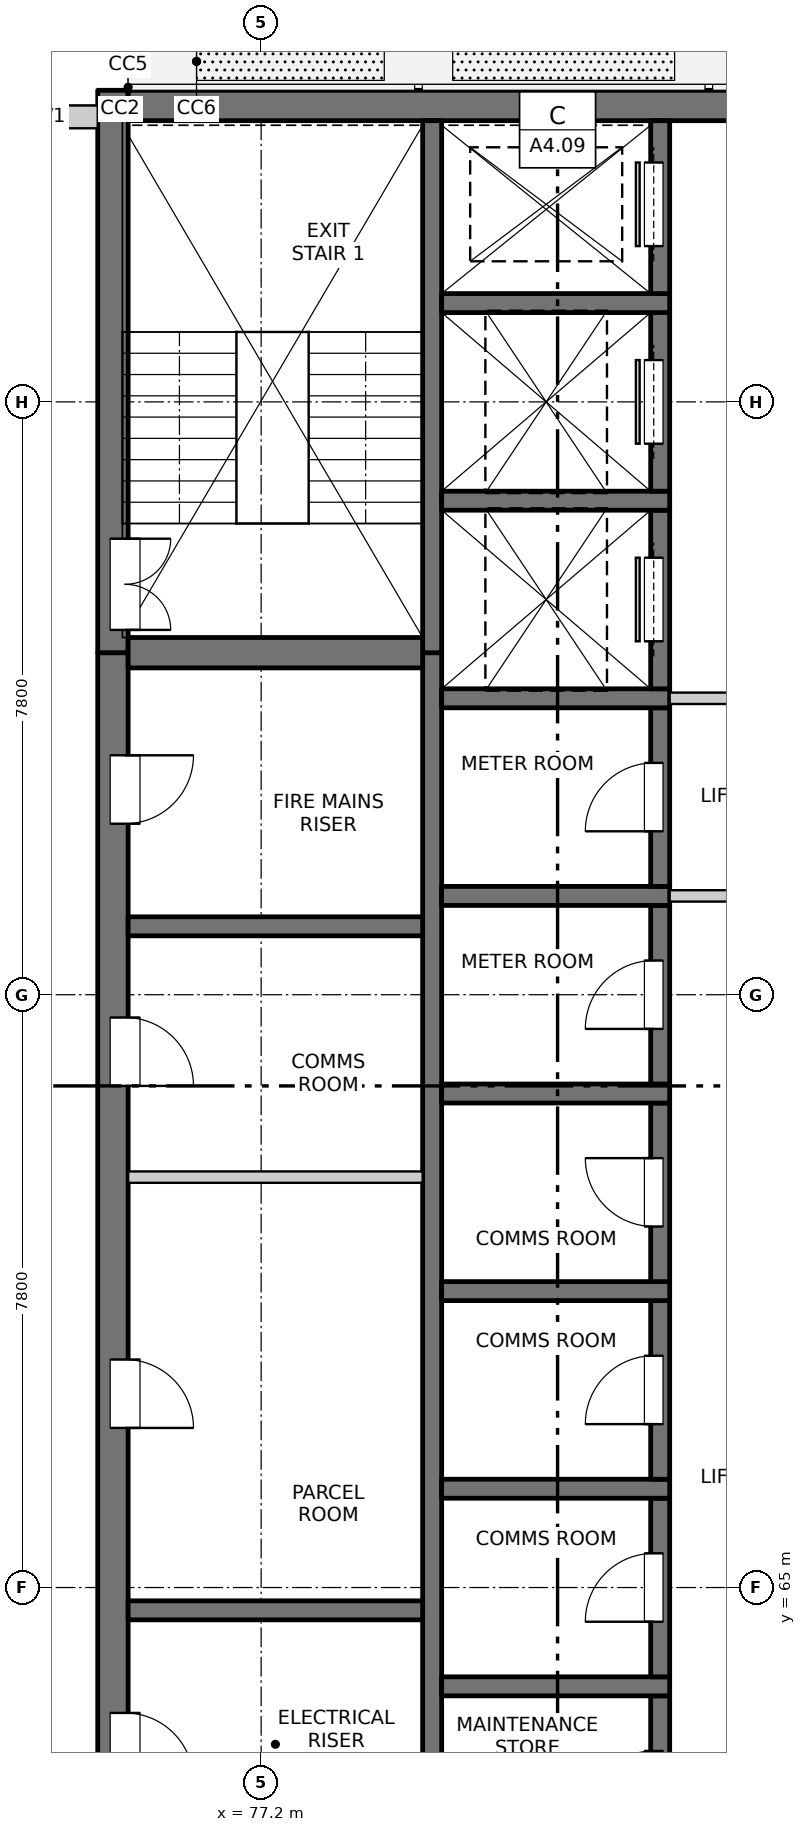
"""IFC4 building model, lengths in metres.
Left out: names, types, materials, properties, quantities, classifications, styles, units other than length and angle.
Written with IfcOpenShell. Run it as: python <this file> out.ifc"""

import sys

from ifc_helpers import new_model, si_unit, direction, frame, frame_2d, origin, place, context, subcontext, project, spatial, rectangle, extrude, element, fill, save


model = new_model("IFC4")
c1 = context("Model", 3, precision=1e-05, world=origin(), true_north=direction((0.0, 1.0)))
c2 = subcontext(c1, "Body", "Model", "MODEL_VIEW")
j1 = project(units=[si_unit("LENGTHUNIT", "METRE"), si_unit("PLANEANGLEUNIT", "RADIAN")], contexts=[c1])
p1 = place(None, origin())
s1 = spatial("IfcSite", under=j1, at=p1, CompositionType="ELEMENT")
p2 = place(p1, origin())
s2 = spatial("IfcBuilding", under=s1, at=p2, CompositionType="ELEMENT")
p3 = place(p2, frame((0.0, 0.0, 246.0)))
s3 = spatial("IfcBuildingStorey", under=s2, at=p3, CompositionType="ELEMENT", Elevation=246.0)
p4 = place(p3, frame((75.25, 55.05, -0.3), z_axis=(0.0, 0.0, 1.0), x_axis=(0.0, 1.0, 0.0)))
e1 = element("IfcWall", 1, at=p4, inside=s3, PredefinedType="SOLIDWALL", context=c2, shape_type="SweptSolid", body=[
    extrude(rectangle(XDim=22.25, YDim=0.4, at=frame_2d((11.125, 0.0))), origin(), (0.0, 0.0, 1.0), 3.45),
])
p5 = place(p4, frame((7.4, 0.0, 0.3)))
e2 = element("IfcOpeningElement", 2, at=p5, cuts=e1, PredefinedType="OPENING", context=c2, shape_type="SweptSolid", body=[
    extrude(rectangle(XDim=0.9, YDim=2.1, at=frame_2d((0.45, 1.05))), frame((0.0, 0.21, 0.0), z_axis=(0.0, -1.0, 0.0), x_axis=(1.0, 0.0, 0.0)), (0.0, 0.0, 1.0), 0.42),
])
p6 = place(p4, frame((12.05, 0.0, 0.3)))
e3 = element("IfcOpeningElement", 3, at=p6, cuts=e1, PredefinedType="OPENING", context=c2, shape_type="SweptSolid", body=[
    extrude(rectangle(XDim=0.9, YDim=2.1, at=frame_2d((0.45, 1.05))), frame((0.0, 0.21, 0.0), z_axis=(0.0, -1.0, 0.0), x_axis=(1.0, 0.0, 0.0)), (0.0, 0.0, 1.0), 0.42),
])
p7 = place(p4, frame((16.55, 0.0, 0.3)))
e4 = element("IfcOpeningElement", 4, at=p7, cuts=e1, PredefinedType="OPENING", context=c2, shape_type="SweptSolid", body=[
    extrude(rectangle(XDim=0.9, YDim=2.1, at=frame_2d((0.45, 1.05))), frame((0.0, 0.21, 0.0), z_axis=(0.0, -1.0, 0.0), x_axis=(1.0, 0.0, 0.0)), (0.0, 0.0, 1.0), 0.42),
])
p8 = place(p4, frame((20.0, 0.0, 0.3)))
e5 = element("IfcOpeningElement", 5, at=p8, cuts=e1, PredefinedType="OPENING", context=c2, shape_type="SweptSolid", body=[
    extrude(rectangle(XDim=0.9, YDim=2.1, at=frame_2d((0.45, 1.05))), frame((0.0, 0.21, 0.0), z_axis=(0.0, -1.0, 0.0), x_axis=(1.0, 0.0, 0.0)), (0.0, 0.0, 1.0), 0.42),
])
p9 = place(p3, frame((75.25, 77.3, -0.3), z_axis=(0.0, 0.0, 1.0), x_axis=(0.0, 1.0, 0.0)))
e6 = element("IfcWall", 6, at=p9, inside=s3, PredefinedType="SOLIDWALL", context=c2, shape_type="SweptSolid", body=[
    extrude(rectangle(XDim=7.4, YDim=0.4, at=frame_2d((3.7, 0.0))), origin(), (0.0, 0.0, 1.0), 3.45),
])
p10 = place(p9, frame((0.3, 0.0, 0.3)))
e7 = element("IfcOpeningElement", 7, at=p10, cuts=e6, PredefinedType="OPENING", context=c2, shape_type="SweptSolid", body=[
    extrude(rectangle(XDim=1.2, YDim=2.1, at=frame_2d((0.6, 1.05))), frame((0.0, 0.21, 0.0), z_axis=(0.0, -1.0, 0.0), x_axis=(1.0, 0.0, 0.0)), (0.0, 0.0, 1.0), 0.42),
])
p11 = place(p3, frame((75.45, 84.5, -0.3), z_axis=(0.0, 0.0, 1.0), x_axis=(1.0, 0.0, 0.0)))
e8 = element("IfcWall", 8, at=p11, inside=s3, PredefinedType="SOLIDWALL", context=c2, shape_type="SweptSolid", body=[
    extrude(rectangle(XDim=19.1, YDim=0.4, at=frame_2d((9.55, 0.0))), origin(), (0.0, 0.0, 1.0), 3.45),
])
p12 = place(p3, frame((79.45, 60.975, -0.3), z_axis=(0.0, 0.0, 1.0), x_axis=(0.0, 1.0, 0.0)))
e9 = element("IfcWall", 9, at=p12, inside=s3, PredefinedType="SOLIDWALL", context=c2, shape_type="SweptSolid", body=[
    extrude(rectangle(XDim=16.325, YDim=0.25, at=frame_2d((8.163, 0.0))), origin(), (0.0, 0.0, 1.0), 3.45),
])
p13 = place(p3, frame((79.45, 77.3, -0.3), z_axis=(0.0, 0.0, 1.0), x_axis=(0.0, 1.0, 0.0)))
e10 = element("IfcWall", 10, at=p13, inside=s3, PredefinedType="SOLIDWALL", context=c2, shape_type="SweptSolid", body=[
    extrude(rectangle(XDim=7.0, YDim=0.25, at=frame_2d((3.5, 0.0))), origin(), (0.0, 0.0, 1.0), 3.45),
])
p14 = place(p3, frame((82.45, 61.225, -0.3), z_axis=(0.0, 0.0, 1.0), x_axis=(0.0, 1.0, 0.0)))
e11 = element("IfcWall", 11, at=p14, inside=s3, PredefinedType="SOLIDWALL", context=c2, shape_type="SweptSolid", body=[
    extrude(rectangle(XDim=2.35, YDim=0.25, at=frame_2d((1.175, 0.0))), origin(), (0.0, 0.0, 1.0), 3.45),
])
p15 = place(p14, frame((0.725, 0.0, 0.3)))
e12 = element("IfcOpeningElement", 12, at=p15, cuts=e11, PredefinedType="OPENING", context=c2, shape_type="SweptSolid", body=[
    extrude(rectangle(XDim=0.9, YDim=2.1, at=frame_2d((0.45, 1.05))), frame((0.0, 0.135, 0.0), z_axis=(0.0, -1.0, 0.0), x_axis=(1.0, 0.0, 0.0)), (0.0, 0.0, 1.0), 0.27),
])
p16 = place(p3, frame((79.575, 63.7, -0.3), z_axis=(0.0, 0.0, 1.0), x_axis=(1.0, 0.0, 0.0)))
e13 = element("IfcWall", 13, at=p16, inside=s3, PredefinedType="SOLIDWALL", context=c2, shape_type="SweptSolid", body=[
    extrude(rectangle(XDim=3.0, YDim=0.25, at=frame_2d((1.5, 0.0))), origin(), (0.0, 0.0, 1.0), 3.45),
])
p17 = place(p3, frame((82.45, 63.825, -0.3), z_axis=(0.0, 0.0, 1.0), x_axis=(0.0, 1.0, 0.0)))
e14 = element("IfcWall", 14, at=p17, inside=s3, PredefinedType="SOLIDWALL", context=c2, shape_type="SweptSolid", body=[
    extrude(rectangle(XDim=2.35, YDim=0.25, at=frame_2d((1.175, 0.0))), origin(), (0.0, 0.0, 1.0), 3.45),
])
p18 = place(p17, frame((0.725, 0.0, 0.3)))
e15 = element("IfcOpeningElement", 15, at=p18, cuts=e14, PredefinedType="OPENING", context=c2, shape_type="SweptSolid", body=[
    extrude(rectangle(XDim=0.9, YDim=2.1, at=frame_2d((0.45, 1.05))), frame((0.0, 0.135, 0.0), z_axis=(0.0, -1.0, 0.0), x_axis=(1.0, 0.0, 0.0)), (0.0, 0.0, 1.0), 0.27),
])
p19 = place(p3, frame((79.575, 66.3, -0.3), z_axis=(0.0, 0.0, 1.0), x_axis=(1.0, 0.0, 0.0)))
e16 = element("IfcWall", 16, at=p19, inside=s3, PredefinedType="SOLIDWALL", context=c2, shape_type="SweptSolid", body=[
    extrude(rectangle(XDim=3.0, YDim=0.25, at=frame_2d((1.5, 0.0))), origin(), (0.0, 0.0, 1.0), 3.45),
])
p20 = place(p3, frame((82.45, 66.425, -0.3), z_axis=(0.0, 0.0, 1.0), x_axis=(0.0, 1.0, 0.0)))
e17 = element("IfcWall", 17, at=p20, inside=s3, PredefinedType="SOLIDWALL", context=c2, shape_type="SweptSolid", body=[
    extrude(rectangle(XDim=2.35, YDim=0.25, at=frame_2d((1.175, 0.0))), origin(), (0.0, 0.0, 1.0), 3.45),
])
p21 = place(p20, frame((0.725, 0.0, 0.3)))
e18 = element("IfcOpeningElement", 18, at=p21, cuts=e17, PredefinedType="OPENING", context=c2, shape_type="SweptSolid", body=[
    extrude(rectangle(XDim=0.9, YDim=2.1, at=frame_2d((0.45, 1.05))), frame((0.0, 0.135, 0.0), z_axis=(0.0, -1.0, 0.0), x_axis=(1.0, 0.0, 0.0)), (0.0, 0.0, 1.0), 0.27),
])
p22 = place(p3, frame((79.575, 68.9, -0.3), z_axis=(0.0, 0.0, 1.0), x_axis=(1.0, 0.0, 0.0)))
e19 = element("IfcWall", 19, at=p22, inside=s3, PredefinedType="SOLIDWALL", context=c2, shape_type="SweptSolid", body=[
    extrude(rectangle(XDim=3.0, YDim=0.25, at=frame_2d((1.5, 0.0))), origin(), (0.0, 0.0, 1.0), 3.45),
])
p23 = place(p3, frame((82.45, 69.025, -0.3), z_axis=(0.0, 0.0, 1.0), x_axis=(0.0, 1.0, 0.0)))
e20 = element("IfcWall", 20, at=p23, inside=s3, PredefinedType="SOLIDWALL", context=c2, shape_type="SweptSolid", body=[
    extrude(rectangle(XDim=2.35, YDim=0.25, at=frame_2d((1.175, 0.0))), origin(), (0.0, 0.0, 1.0), 3.45),
])
p24 = place(p23, frame((0.725, 0.0, 0.3)))
e21 = element("IfcOpeningElement", 21, at=p24, cuts=e20, PredefinedType="OPENING", context=c2, shape_type="SweptSolid", body=[
    extrude(rectangle(XDim=0.9, YDim=2.1, at=frame_2d((0.45, 1.05))), frame((0.0, 0.135, 0.0), z_axis=(0.0, -1.0, 0.0), x_axis=(1.0, 0.0, 0.0)), (0.0, 0.0, 1.0), 0.27),
])
p25 = place(p3, frame((79.575, 71.5, -0.3), z_axis=(0.0, 0.0, 1.0), x_axis=(1.0, 0.0, 0.0)))
e22 = element("IfcWall", 22, at=p25, inside=s3, PredefinedType="SOLIDWALL", context=c2, shape_type="SweptSolid", body=[
    extrude(rectangle(XDim=3.0, YDim=0.25, at=frame_2d((1.5, 0.0))), origin(), (0.0, 0.0, 1.0), 3.45),
])
p26 = place(p3, frame((82.45, 71.625, -0.3), z_axis=(0.0, 0.0, 1.0), x_axis=(0.0, 1.0, 0.0)))
e23 = element("IfcWall", 23, at=p26, inside=s3, PredefinedType="SOLIDWALL", context=c2, shape_type="SweptSolid", body=[
    extrude(rectangle(XDim=2.35, YDim=0.25, at=frame_2d((1.175, 0.0))), origin(), (0.0, 0.0, 1.0), 3.45),
])
p27 = place(p26, frame((0.725, 0.0, 0.3)))
e24 = element("IfcOpeningElement", 24, at=p27, cuts=e23, PredefinedType="OPENING", context=c2, shape_type="SweptSolid", body=[
    extrude(rectangle(XDim=0.9, YDim=2.1, at=frame_2d((0.45, 1.05))), frame((0.0, 0.135, 0.0), z_axis=(0.0, -1.0, 0.0), x_axis=(1.0, 0.0, 0.0)), (0.0, 0.0, 1.0), 0.27),
])
p28 = place(p3, frame((79.575, 74.1, -0.3), z_axis=(0.0, 0.0, 1.0), x_axis=(1.0, 0.0, 0.0)))
e25 = element("IfcWall", 25, at=p28, inside=s3, PredefinedType="SOLIDWALL", context=c2, shape_type="SweptSolid", body=[
    extrude(rectangle(XDim=3.0, YDim=0.25, at=frame_2d((1.5, 0.0))), origin(), (0.0, 0.0, 1.0), 3.45),
])
p29 = place(p3, frame((82.45, 74.225, -0.3), z_axis=(0.0, 0.0, 1.0), x_axis=(0.0, 1.0, 0.0)))
e26 = element("IfcWall", 26, at=p29, inside=s3, PredefinedType="SOLIDWALL", context=c2, shape_type="SweptSolid", body=[
    extrude(rectangle(XDim=2.35, YDim=0.25, at=frame_2d((1.175, 0.0))), origin(), (0.0, 0.0, 1.0), 3.45),
])
p30 = place(p29, frame((0.725, 0.0, 0.3)))
e27 = element("IfcOpeningElement", 27, at=p30, cuts=e26, PredefinedType="OPENING", context=c2, shape_type="SweptSolid", body=[
    extrude(rectangle(XDim=0.9, YDim=2.1, at=frame_2d((0.45, 1.05))), frame((0.0, 0.135, 0.0), z_axis=(0.0, -1.0, 0.0), x_axis=(1.0, 0.0, 0.0)), (0.0, 0.0, 1.0), 0.27),
])
p31 = place(p3, frame((79.575, 76.7, -0.3), z_axis=(0.0, 0.0, 1.0), x_axis=(1.0, 0.0, 0.0)))
e28 = element("IfcWall", 28, at=p31, inside=s3, PredefinedType="SOLIDWALL", context=c2, shape_type="SweptSolid", body=[
    extrude(rectangle(XDim=3.0, YDim=0.25, at=frame_2d((1.5, 0.0))), origin(), (0.0, 0.0, 1.0), 3.45),
])
p32 = place(p3, frame((82.45, 76.825, -0.3), z_axis=(0.0, 0.0, 1.0), x_axis=(0.0, 1.0, 0.0)))
e29 = element("IfcWall", 29, at=p32, inside=s3, PredefinedType="SOLIDWALL", context=c2, shape_type="SweptSolid", body=[
    extrude(rectangle(XDim=2.35, YDim=0.25, at=frame_2d((1.175, 0.0))), origin(), (0.0, 0.0, 1.0), 3.45),
])
p33 = place(p32, frame((0.625, 0.0, 0.3)))
e30 = element("IfcOpeningElement", 30, at=p33, cuts=e29, PredefinedType="OPENING", context=c2, shape_type="SweptSolid", body=[
    extrude(rectangle(XDim=1.1, YDim=2.1, at=frame_2d((0.55, 1.05))), frame((0.0, 0.135, 0.0), z_axis=(0.0, -1.0, 0.0), x_axis=(1.0, 0.0, 0.0)), (0.0, 0.0, 1.0), 0.27),
])
p34 = place(p3, frame((79.575, 79.3, -0.3), z_axis=(0.0, 0.0, 1.0), x_axis=(1.0, 0.0, 0.0)))
e31 = element("IfcWall", 31, at=p34, inside=s3, PredefinedType="SOLIDWALL", context=c2, shape_type="SweptSolid", body=[
    extrude(rectangle(XDim=3.0, YDim=0.25, at=frame_2d((1.5, 0.0))), origin(), (0.0, 0.0, 1.0), 3.45),
])
p35 = place(p3, frame((82.45, 79.425, -0.3), z_axis=(0.0, 0.0, 1.0), x_axis=(0.0, 1.0, 0.0)))
e32 = element("IfcWall", 32, at=p35, inside=s3, PredefinedType="SOLIDWALL", context=c2, shape_type="SweptSolid", body=[
    extrude(rectangle(XDim=2.35, YDim=0.25, at=frame_2d((1.175, 0.0))), origin(), (0.0, 0.0, 1.0), 3.45),
])
p36 = place(p35, frame((0.625, 0.0, 0.3)))
e33 = element("IfcOpeningElement", 33, at=p36, cuts=e32, PredefinedType="OPENING", context=c2, shape_type="SweptSolid", body=[
    extrude(rectangle(XDim=1.1, YDim=2.1, at=frame_2d((0.55, 1.05))), frame((0.0, 0.135, 0.0), z_axis=(0.0, -1.0, 0.0), x_axis=(1.0, 0.0, 0.0)), (0.0, 0.0, 1.0), 0.27),
])
p37 = place(p3, frame((79.575, 81.9, -0.3), z_axis=(0.0, 0.0, 1.0), x_axis=(1.0, 0.0, 0.0)))
e34 = element("IfcWall", 34, at=p37, inside=s3, PredefinedType="SOLIDWALL", context=c2, shape_type="SweptSolid", body=[
    extrude(rectangle(XDim=3.0, YDim=0.25, at=frame_2d((1.5, 0.0))), origin(), (0.0, 0.0, 1.0), 3.45),
])
p38 = place(p3, frame((82.45, 82.025, -0.3), z_axis=(0.0, 0.0, 1.0), x_axis=(0.0, 1.0, 0.0)))
e35 = element("IfcWall", 35, at=p38, inside=s3, PredefinedType="SOLIDWALL", context=c2, shape_type="SweptSolid", body=[
    extrude(rectangle(XDim=2.275, YDim=0.25, at=frame_2d((1.138, 0.0))), origin(), (0.0, 0.0, 1.0), 3.45),
])
p39 = place(p38, frame((0.625, 0.0, 0.3)))
e36 = element("IfcOpeningElement", 36, at=p39, cuts=e35, PredefinedType="OPENING", context=c2, shape_type="SweptSolid", body=[
    extrude(rectangle(XDim=1.1, YDim=2.1, at=frame_2d((0.55, 1.05))), frame((0.0, 0.135, 0.0), z_axis=(0.0, -1.0, 0.0), x_axis=(1.0, 0.0, 0.0)), (0.0, 0.0, 1.0), 0.27),
])
for number, where, z_axis, x_axis in (
    (37, (75.45, 64.7, -0.3), (0.0, 0.0, 1.0), (1.0, 0.0, 0.0)),
    (38, (75.45, 73.7, -0.3), (0.0, 0.0, 1.0), (1.0, 0.0, 0.0)),
):
    element("IfcWall", number, at=place(p3, frame(where, z_axis=z_axis, x_axis=x_axis)), inside=s3, PredefinedType="SOLIDWALL", context=c2, shape_type="SweptSolid", body=[
        extrude(rectangle(XDim=3.875, YDim=0.25, at=frame_2d((1.938, 0.0))), origin(), (0.0, 0.0, 1.0), 3.45),
    ])
p40 = place(p3, frame((75.45, 77.3, -0.3), z_axis=(0.0, 0.0, 1.0), x_axis=(1.0, 0.0, 0.0)))
e39 = element("IfcWall", 39, at=p40, inside=s3, PredefinedType="SOLIDWALL", context=c2, shape_type="SweptSolid", body=[
    extrude(rectangle(XDim=3.875, YDim=0.4, at=frame_2d((1.938, 0.0))), origin(), (0.0, 0.0, 1.0), 3.45),
])
p41 = place(p3, frame((73.625, 84.35, 0.0), z_axis=(0.0, 0.0, 1.0), x_axis=(1.0, 0.0, 0.0)))
e40 = element("IfcWall", 40, at=p41, inside=s3, PredefinedType="SOLIDWALL", context=c2, shape_type="SweptSolid", body=[
    extrude(rectangle(XDim=1.425, YDim=0.3, at=frame_2d((0.712, 0.0))), origin(), (0.0, 0.0, 1.0), 2.7),
])
p42 = place(p3, frame((75.45, 70.4, 0.0), z_axis=(0.0, 0.0, 1.0), x_axis=(1.0, 0.0, 0.0)))
e41 = element("IfcWall", 41, at=p42, inside=s3, PredefinedType="PARTITIONING", context=c2, shape_type="SweptSolid", body=[
    extrude(rectangle(XDim=3.875, YDim=0.15, at=frame_2d((1.938, 0.0))), origin(), (0.0, 0.0, 1.0), 3.15),
])
p43 = place(p3, frame((82.575, 74.1, 0.0), z_axis=(0.0, 0.0, 1.0), x_axis=(1.0, 0.0, 0.0)))
e42 = element("IfcWall", 42, at=p43, inside=s3, PredefinedType="PARTITIONING", context=c2, shape_type="SweptSolid", body=[
    extrude(rectangle(XDim=4.85, YDim=0.15, at=frame_2d((2.425, 0.0))), origin(), (0.0, 0.0, 1.0), 3.15),
])
p44 = place(p43, frame((1.525, 0.0, 0.0)))
e43 = element("IfcOpeningElement", 43, at=p44, cuts=e42, PredefinedType="OPENING", context=c2, shape_type="SweptSolid", body=[
    extrude(rectangle(XDim=1.8, YDim=2.1, at=frame_2d((0.9, 1.05))), frame((0.0, 0.085, 0.0), z_axis=(0.0, -1.0, 0.0), x_axis=(1.0, 0.0, 0.0)), (0.0, 0.0, 1.0), 0.17),
])
p45 = place(p3, frame((82.575, 76.7, 0.0), z_axis=(0.0, 0.0, 1.0), x_axis=(1.0, 0.0, 0.0)))
e44 = element("IfcWall", 44, at=p45, inside=s3, PredefinedType="PARTITIONING", context=c2, shape_type="SweptSolid", body=[
    extrude(rectangle(XDim=4.85, YDim=0.15, at=frame_2d((2.425, 0.0))), origin(), (0.0, 0.0, 1.0), 3.15),
])
p46 = place(p45, frame((1.525, 0.0, 0.0)))
e45 = element("IfcOpeningElement", 45, at=p46, cuts=e44, PredefinedType="OPENING", context=c2, shape_type="SweptSolid", body=[
    extrude(rectangle(XDim=1.8, YDim=2.1, at=frame_2d((0.9, 1.05))), frame((0.0, 0.085, 0.0), z_axis=(0.0, -1.0, 0.0), x_axis=(1.0, 0.0, 0.0)), (0.0, 0.0, 1.0), 0.17),
])
p47 = place(p15, origin())
e46 = element("IfcDoor", 46, at=p47, inside=s3, OperationType="SINGLE_SWING_LEFT", PredefinedType="DOOR", context=c2, shape_type="SweptSolid", body=[
    extrude(rectangle(XDim=0.9, YDim=2.1, at=frame_2d((0.45, 1.05))), frame((0.0, 0.11, 0.0), z_axis=(0.0, -1.0, 0.0), x_axis=(1.0, 0.0, 0.0)), (0.0, 0.0, 1.0), 0.05),
])
fill(e12, e46)
p48 = place(p5, origin())
e47 = element("IfcDoor", 47, at=p48, inside=s3, OperationType="SINGLE_SWING_RIGHT", PredefinedType="DOOR", context=c2, shape_type="SweptSolid", body=[
    extrude(rectangle(XDim=0.9, YDim=2.1, at=frame_2d((0.45, 1.05))), frame((0.0, -0.135, 0.0), z_axis=(0.0, -1.0, 0.0), x_axis=(1.0, 0.0, 0.0)), (0.0, 0.0, 1.0), 0.05),
])
fill(e2, e47)
p49 = place(p18, origin())
e48 = element("IfcDoor", 48, at=p49, inside=s3, OperationType="SINGLE_SWING_LEFT", PredefinedType="DOOR", context=c2, shape_type="SweptSolid", body=[
    extrude(rectangle(XDim=0.9, YDim=2.1, at=frame_2d((0.45, 1.05))), frame((0.0, 0.11, 0.0), z_axis=(0.0, -1.0, 0.0), x_axis=(1.0, 0.0, 0.0)), (0.0, 0.0, 1.0), 0.05),
])
fill(e15, e48)
p50 = place(p6, origin())
e49 = element("IfcDoor", 49, at=p50, inside=s3, OperationType="SINGLE_SWING_RIGHT", PredefinedType="DOOR", context=c2, shape_type="SweptSolid", body=[
    extrude(rectangle(XDim=0.9, YDim=2.1, at=frame_2d((0.45, 1.05))), frame((0.0, -0.135, 0.0), z_axis=(0.0, -1.0, 0.0), x_axis=(1.0, 0.0, 0.0)), (0.0, 0.0, 1.0), 0.05),
])
fill(e3, e49)
p51 = place(p21, origin())
e50 = element("IfcDoor", 50, at=p51, inside=s3, OperationType="SINGLE_SWING_LEFT", PredefinedType="DOOR", context=c2, shape_type="SweptSolid", body=[
    extrude(rectangle(XDim=0.9, YDim=2.1, at=frame_2d((0.45, 1.05))), frame((0.0, 0.11, 0.0), z_axis=(0.0, -1.0, 0.0), x_axis=(1.0, 0.0, 0.0)), (0.0, 0.0, 1.0), 0.05),
])
fill(e18, e50)
p52 = place(p24, origin())
e51 = element("IfcDoor", 51, at=p52, inside=s3, OperationType="SINGLE_SWING_RIGHT", PredefinedType="DOOR", context=c2, shape_type="SweptSolid", body=[
    extrude(rectangle(XDim=0.9, YDim=2.1, at=frame_2d((0.45, 1.05))), frame((0.0, 0.11, 0.0), z_axis=(0.0, -1.0, 0.0), x_axis=(1.0, 0.0, 0.0)), (0.0, 0.0, 1.0), 0.05),
])
fill(e21, e51)
p53 = place(p7, origin())
e52 = element("IfcDoor", 52, at=p53, inside=s3, OperationType="SINGLE_SWING_RIGHT", PredefinedType="DOOR", context=c2, shape_type="SweptSolid", body=[
    extrude(rectangle(XDim=0.9, YDim=2.1, at=frame_2d((0.45, 1.05))), frame((0.0, -0.135, 0.0), z_axis=(0.0, -1.0, 0.0), x_axis=(1.0, 0.0, 0.0)), (0.0, 0.0, 1.0), 0.05),
])
fill(e4, e52)
p54 = place(p27, origin())
e53 = element("IfcDoor", 53, at=p54, inside=s3, OperationType="SINGLE_SWING_LEFT", PredefinedType="DOOR", context=c2, shape_type="SweptSolid", body=[
    extrude(rectangle(XDim=0.9, YDim=2.1, at=frame_2d((0.45, 1.05))), frame((0.0, 0.11, 0.0), z_axis=(0.0, -1.0, 0.0), x_axis=(1.0, 0.0, 0.0)), (0.0, 0.0, 1.0), 0.05),
])
fill(e24, e53)
p55 = place(p30, origin())
e54 = element("IfcDoor", 54, at=p55, inside=s3, OperationType="SINGLE_SWING_LEFT", PredefinedType="DOOR", context=c2, shape_type="SweptSolid", body=[
    extrude(rectangle(XDim=0.9, YDim=2.1, at=frame_2d((0.45, 1.05))), frame((0.0, 0.11, 0.0), z_axis=(0.0, -1.0, 0.0), x_axis=(1.0, 0.0, 0.0)), (0.0, 0.0, 1.0), 0.05),
])
fill(e27, e54)
p56 = place(p8, origin())
e55 = element("IfcDoor", 55, at=p56, inside=s3, OperationType="SINGLE_SWING_LEFT", PredefinedType="DOOR", context=c2, shape_type="SweptSolid", body=[
    extrude(rectangle(XDim=0.9, YDim=2.1, at=frame_2d((0.45, 1.05))), frame((0.0, -0.135, 0.0), z_axis=(0.0, -1.0, 0.0), x_axis=(1.0, 0.0, 0.0)), (0.0, 0.0, 1.0), 0.05),
])
fill(e5, e55)
p57 = place(p33, origin())
e56 = element("IfcDoor", 56, at=p57, inside=s3, OperationType="SLIDING_TO_LEFT", PredefinedType="DOOR", context=c2, shape_type="SweptSolid", body=[
    extrude(rectangle(XDim=1.1, YDim=2.1, at=frame_2d((0.55, 1.05))), frame((0.0, 0.11, 0.0), z_axis=(0.0, -1.0, 0.0), x_axis=(1.0, 0.0, 0.0)), (0.0, 0.0, 1.0), 0.05),
])
fill(e30, e56)
p58 = place(p10, origin())
e57 = element("IfcDoor", 57, at=p58, inside=s3, OperationType="DOUBLE_DOOR_SINGLE_SWING", PredefinedType="DOOR", context=c2, shape_type="SweptSolid", body=[
    extrude(rectangle(XDim=1.2, YDim=2.1, at=frame_2d((0.6, 1.05))), frame((0.0, -0.135, 0.0), z_axis=(0.0, -1.0, 0.0), x_axis=(1.0, 0.0, 0.0)), (0.0, 0.0, 1.0), 0.05),
])
fill(e7, e57)
p59 = place(p36, origin())
e58 = element("IfcDoor", 58, at=p59, inside=s3, OperationType="SLIDING_TO_LEFT", PredefinedType="DOOR", context=c2, shape_type="SweptSolid", body=[
    extrude(rectangle(XDim=1.1, YDim=2.1, at=frame_2d((0.55, 1.05))), frame((0.0, 0.11, 0.0), z_axis=(0.0, -1.0, 0.0), x_axis=(1.0, 0.0, 0.0)), (0.0, 0.0, 1.0), 0.05),
])
fill(e33, e58)
p60 = place(p39, origin())
e59 = element("IfcDoor", 59, at=p60, inside=s3, OperationType="SLIDING_TO_RIGHT", PredefinedType="DOOR", context=c2, shape_type="SweptSolid", body=[
    extrude(rectangle(XDim=1.1, YDim=2.1, at=frame_2d((0.55, 1.05))), frame((0.0, 0.11, 0.0), z_axis=(0.0, -1.0, 0.0), x_axis=(1.0, 0.0, 0.0)), (0.0, 0.0, 1.0), 0.05),
])
fill(e36, e59)
save(model, sys.argv[1])
